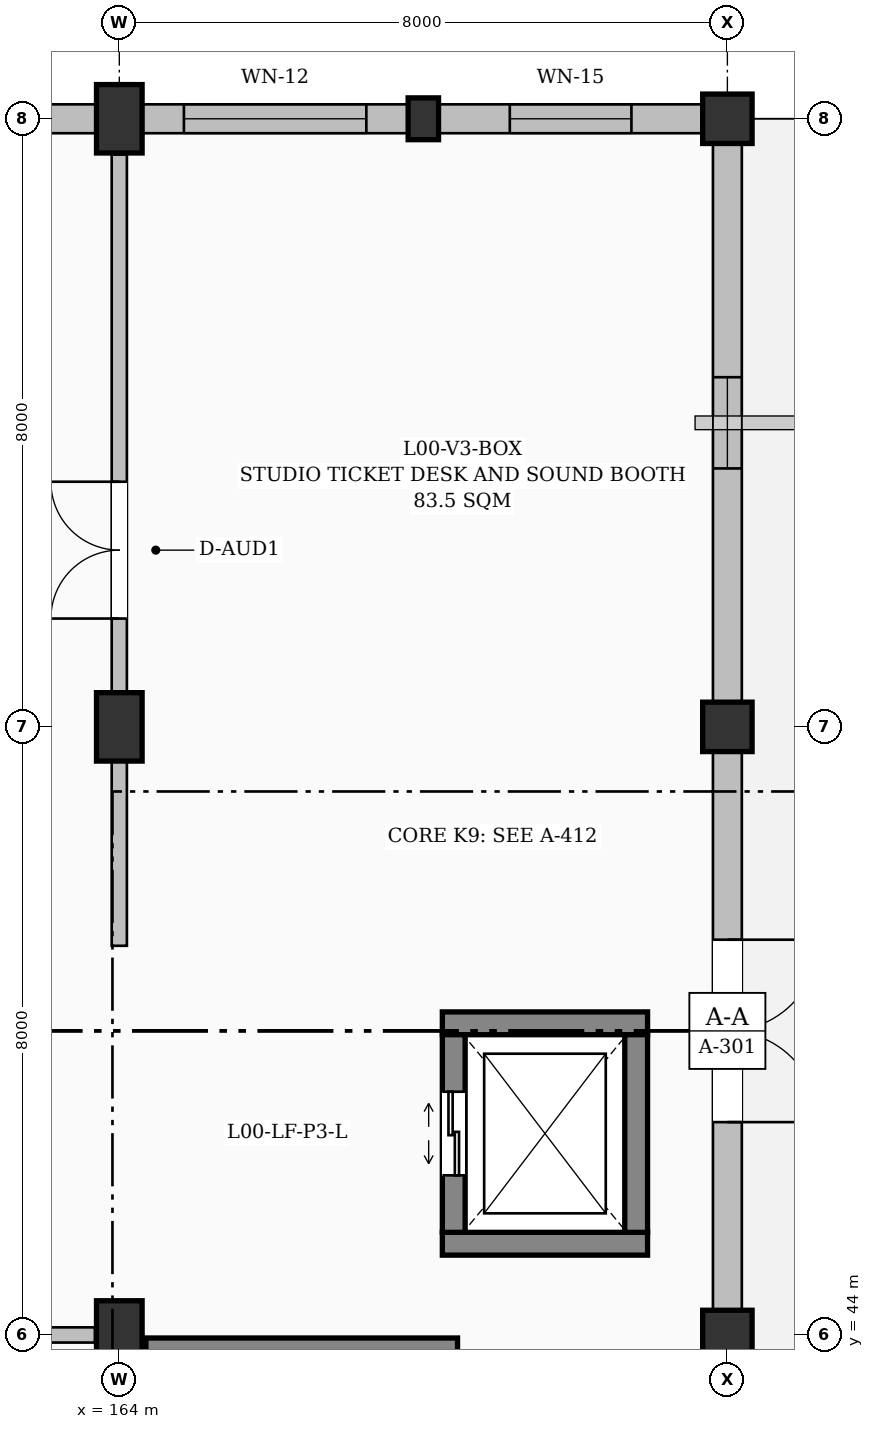
"""IFC4 building model, lengths in metres.
Left out: names, types, materials, properties, quantities, classifications, styles, units other than length and angle.
Written with IfcOpenShell. Run it as: python <this file> out.ifc"""

import sys

from ifc_helpers import new_model, si_unit, direction, frame, frame_2d, origin, origin_2d, place, context, subcontext, project, spatial, rectangle, extrude, element, fill, save


model = new_model("IFC4")
c1 = context("Model", 3, precision=1e-05, world=origin(), true_north=direction((0.0, 1.0)))
c2 = subcontext(c1, "Body", "Model", "MODEL_VIEW")
j1 = project(units=[si_unit("LENGTHUNIT", "METRE"), si_unit("PLANEANGLEUNIT", "RADIAN")], contexts=[c1])
p1 = place(None, origin())
s1 = spatial("IfcSite", under=j1, at=p1, CompositionType="ELEMENT")
p2 = place(p1, origin())
s2 = spatial("IfcBuilding", under=s1, at=p2, CompositionType="ELEMENT")
p3 = place(p2, origin())
s3 = spatial("IfcBuildingStorey", under=s2, at=p3, CompositionType="ELEMENT", Elevation=0.0)
for number, where, z_axis, x_axis in (
    (1, (164.0, 44.0, 0.0), (0.0, 0.0, 1.0), (1.0, 0.0, 0.0)),
    (2, (164.0, 52.0, 0.0), (0.0, 0.0, 1.0), (1.0, 0.0, 0.0)),
    (3, (164.0, 60.0, 0.0), (0.0, 0.0, 1.0), (1.0, 0.0, 0.0)),
):
    element("IfcColumn", number, at=place(p3, frame(where, z_axis=z_axis, x_axis=x_axis)), inside=s3, PredefinedType="COLUMN", context=c2, shape_type="SweptSolid", body=[
        extrude(rectangle(XDim=0.6, YDim=0.9, at=origin_2d()), origin(), (0.0, 0.0, 1.0), 4.8),
    ])
p4 = place(p3, frame((168.0, 60.0, 0.0), z_axis=(0.0, 0.0, 1.0), x_axis=(1.0, 0.0, 0.0)))
e4 = element("IfcColumn", 4, at=p4, inside=s3, PredefinedType="PILASTER", context=c2, shape_type="SweptSolid", body=[
    extrude(rectangle(XDim=0.4, YDim=0.55, at=origin_2d()), origin(), (0.0, 0.0, 1.0), 4.8),
])
for number, where, z_axis, x_axis in (
    (5, (172.0, 44.0, 0.0), (0.0, 0.0, 1.0), (1.0, 0.0, 0.0)),
    (6, (172.0, 52.0, 0.0), (0.0, 0.0, 1.0), (1.0, 0.0, 0.0)),
    (7, (172.0, 60.0, 0.0), (0.0, 0.0, 1.0), (1.0, 0.0, 0.0)),
):
    element("IfcColumn", number, at=place(p3, frame(where, z_axis=z_axis, x_axis=x_axis)), inside=s3, PredefinedType="COLUMN", context=c2, shape_type="SweptSolid", body=[
        extrude(rectangle(XDim=0.65, YDim=0.65, at=origin_2d()), origin(), (0.0, 0.0, 1.0), 4.8),
    ])
p5 = place(p3, frame((160.225, 60.0, 0.0), z_axis=(0.0, 0.0, 1.0), x_axis=(1.0, 0.0, 0.0)))
e8 = element("IfcWall", 8, at=p5, inside=s3, PredefinedType="SOLIDWALL", context=c2, shape_type="SweptSolid", body=[
    extrude(rectangle(XDim=3.475, YDim=0.38, at=frame_2d((1.737, 0.0))), origin(), (0.0, 0.0, 1.0), 4.235),
])
p6 = place(p5, frame((0.988, 0.0, 0.95)))
e9 = element("IfcOpeningElement", 9, at=p6, cuts=e8, PredefinedType="OPENING", context=c2, shape_type="SweptSolid", body=[
    extrude(rectangle(XDim=1.5, YDim=1.5, at=frame_2d((0.75, 0.75))), frame((0.0, 0.2, 0.0), z_axis=(0.0, -1.0, 0.0), x_axis=(1.0, 0.0, 0.0)), (0.0, 0.0, 1.0), 0.4),
])
p7 = place(p3, frame((164.3, 60.0, 0.0), z_axis=(0.0, 0.0, 1.0), x_axis=(1.0, 0.0, 0.0)))
e10 = element("IfcWall", 10, at=p7, inside=s3, PredefinedType="SOLIDWALL", context=c2, shape_type="SweptSolid", body=[
    extrude(rectangle(XDim=3.5, YDim=0.38, at=frame_2d((1.75, 0.0))), origin(), (0.0, 0.0, 1.0), 4.035),
])
p8 = place(p7, frame((0.55, 0.0, 0.95)))
e11 = element("IfcOpeningElement", 11, at=p8, cuts=e10, PredefinedType="OPENING", context=c2, shape_type="SweptSolid", body=[
    extrude(rectangle(XDim=2.4, YDim=1.5, at=frame_2d((1.2, 0.75))), frame((0.0, 0.2, 0.0), z_axis=(0.0, -1.0, 0.0), x_axis=(1.0, 0.0, 0.0)), (0.0, 0.0, 1.0), 0.4),
])
p9 = place(p3, frame((168.2, 60.0, 0.0), z_axis=(0.0, 0.0, 1.0), x_axis=(1.0, 0.0, 0.0)))
e12 = element("IfcWall", 12, at=p9, inside=s3, PredefinedType="SOLIDWALL", context=c2, shape_type="SweptSolid", body=[
    extrude(rectangle(XDim=3.475, YDim=0.38, at=frame_2d((1.738, 0.0))), origin(), (0.0, 0.0, 1.0), 4.035),
])
p10 = place(p9, frame((0.938, 0.0, 0.95)))
e13 = element("IfcOpeningElement", 13, at=p10, cuts=e12, PredefinedType="OPENING", context=c2, shape_type="SweptSolid", body=[
    extrude(rectangle(XDim=1.6, YDim=1.2, at=frame_2d((0.8, 0.6))), frame((0.0, 0.2, 0.0), z_axis=(0.0, -1.0, 0.0), x_axis=(1.0, 0.0, 0.0)), (0.0, 0.0, 1.0), 0.4),
])
p11 = place(p3, frame((172.0, 59.675, 0.0), z_axis=(0.0, 0.0, 1.0), x_axis=(0.0, -1.0, 0.0)))
e14 = element("IfcWall", 14, at=p11, inside=s3, PredefinedType="SOLIDWALL", context=c2, shape_type="SweptSolid", body=[
    extrude(rectangle(XDim=7.35, YDim=0.38, at=frame_2d((3.675, 0.0))), origin(), (0.0, 0.0, 1.0), 4.335),
])
p12 = place(p11, frame((3.075, 0.0, 0.95)))
e15 = element("IfcOpeningElement", 15, at=p12, cuts=e14, PredefinedType="OPENING", context=c2, shape_type="SweptSolid", body=[
    extrude(rectangle(XDim=1.2, YDim=1.5, at=frame_2d((0.6, 0.75))), frame((0.0, 0.2, 0.0), z_axis=(0.0, -1.0, 0.0), x_axis=(1.0, 0.0, 0.0)), (0.0, 0.0, 1.0), 0.4),
])
p13 = place(p3, frame((172.0, 51.675, 0.0), z_axis=(0.0, 0.0, 1.0), x_axis=(0.0, -1.0, 0.0)))
e16 = element("IfcWall", 16, at=p13, inside=s3, PredefinedType="SOLIDWALL", context=c2, shape_type="SweptSolid", body=[
    extrude(rectangle(XDim=7.35, YDim=0.38, at=frame_2d((3.675, 0.0))), origin(), (0.0, 0.0, 1.0), 4.235),
])
p14 = place(p13, frame((2.475, 0.0, 0.0)))
e17 = element("IfcOpeningElement", 17, at=p14, cuts=e16, PredefinedType="OPENING", context=c2, shape_type="SweptSolid", body=[
    extrude(rectangle(XDim=2.4, YDim=2.4, at=frame_2d((1.2, 1.2))), frame((0.0, 0.2, 0.0), z_axis=(0.0, -1.0, 0.0), x_axis=(1.0, 0.0, 0.0)), (0.0, 0.0, 1.0), 0.4),
])
p15 = place(p3, frame((168.45, 43.81, 0.0), z_axis=(0.0, 0.0, 1.0), x_axis=(-1.0, 0.0, 0.0)))
e18 = element("IfcWall", 18, at=p15, inside=s3, PredefinedType="SHEAR", context=c2, shape_type="SweptSolid", body=[
    extrude(rectangle(XDim=4.1, YDim=0.3, at=frame_2d((2.05, 0.0))), origin(), (0.0, 0.0, 1.0), 4.55),
])
for number, where, z_axis, x_axis in (
    (19, (168.25, 45.2, 0.0), (0.0, 0.0, 1.0), (1.0, 0.0, 0.0)),
    (20, (170.95, 48.1, 0.0), (0.0, 0.0, 1.0), (-1.0, 0.0, 0.0)),
):
    element("IfcWall", number, at=place(p3, frame(where, z_axis=z_axis, x_axis=x_axis)), inside=s3, PredefinedType="SHEAR", context=c2, shape_type="SweptSolid", body=[
        extrude(rectangle(XDim=2.7, YDim=0.3, at=frame_2d((1.35, 0.0))), origin(), (0.0, 0.0, 1.0), 4.55),
    ])
p16 = place(p3, frame((168.4, 45.35, 0.0), z_axis=(0.0, 0.0, 1.0), x_axis=(0.0, 1.0, 0.0)))
e21 = element("IfcWall", 21, at=p16, inside=s3, PredefinedType="SHEAR", context=c2, shape_type="SweptSolid", body=[
    extrude(rectangle(XDim=2.6, YDim=0.3, at=frame_2d((1.3, 0.0))), origin(), (0.0, 0.0, 1.0), 4.55),
])
p17 = place(p16, frame((0.75, 0.0, 0.0)))
e22 = element("IfcOpeningElement", 22, at=p17, cuts=e21, PredefinedType="OPENING", context=c2, shape_type="SweptSolid", body=[
    extrude(rectangle(XDim=1.1, YDim=2.15, at=frame_2d((0.55, 1.075))), frame((0.0, 0.16, 0.0), z_axis=(0.0, -1.0, 0.0), x_axis=(1.0, 0.0, 0.0)), (0.0, 0.0, 1.0), 0.32),
])
p18 = place(p3, frame((170.8, 47.95, 0.0), z_axis=(0.0, 0.0, 1.0), x_axis=(0.0, -1.0, 0.0)))
e23 = element("IfcWall", 23, at=p18, inside=s3, PredefinedType="SHEAR", context=c2, shape_type="SweptSolid", body=[
    extrude(rectangle(XDim=2.6, YDim=0.3, at=frame_2d((1.3, 0.0))), origin(), (0.0, 0.0, 1.0), 4.55),
])
p19 = place(p3, frame((140.42, 44.0, 0.0), z_axis=(0.0, 0.0, 1.0), x_axis=(1.0, 0.0, 0.0)))
e24 = element("IfcWall", 24, at=p19, inside=s3, PredefinedType="PARTITIONING", context=c2, shape_type="SweptSolid", body=[
    extrude(rectangle(XDim=23.26, YDim=0.2, at=frame_2d((11.63, 0.0))), origin(), (0.0, 0.0, 1.0), 3.735),
])
p20 = place(p19, frame((10.73, 0.0, 0.0)))
e25 = element("IfcOpeningElement", 25, at=p20, cuts=e24, PredefinedType="OPENING", context=c2, shape_type="SweptSolid", body=[
    extrude(rectangle(XDim=1.8, YDim=2.35, at=frame_2d((0.9, 1.175))), frame((0.0, 0.11, 0.0), z_axis=(0.0, -1.0, 0.0), x_axis=(1.0, 0.0, 0.0)), (0.0, 0.0, 1.0), 0.22),
])
p21 = place(p3, frame((164.0, 49.12, 0.0), z_axis=(0.0, 0.0, 1.0), x_axis=(0.0, 1.0, 0.0)))
e26 = element("IfcWall", 26, at=p21, inside=s3, PredefinedType="PARTITIONING", context=c2, shape_type="SweptSolid", body=[
    extrude(rectangle(XDim=10.41, YDim=0.2, at=frame_2d((5.205, 0.0))), origin(), (0.0, 0.0, 1.0), 3.935),
])
p22 = place(p21, frame((4.305, 0.0, 0.0)))
e27 = element("IfcOpeningElement", 27, at=p22, cuts=e26, PredefinedType="OPENING", context=c2, shape_type="SweptSolid", body=[
    extrude(rectangle(XDim=1.8, YDim=2.35, at=frame_2d((0.9, 1.175))), frame((0.0, 0.11, 0.0), z_axis=(0.0, -1.0, 0.0), x_axis=(1.0, 0.0, 0.0)), (0.0, 0.0, 1.0), 0.22),
])
p23 = place(p8, origin())
e28 = element("IfcWindow", 28, at=p23, inside=s3, PartitioningType="TRIPLE_PANEL_VERTICAL", PredefinedType="WINDOW", context=c2, shape_type="SweptSolid", body=[
    extrude(rectangle(XDim=2.4, YDim=1.5, at=frame_2d((1.2, 0.75))), frame((0.0, 0.03, 0.0), z_axis=(0.0, -1.0, 0.0), x_axis=(1.0, 0.0, 0.0)), (0.0, 0.0, 1.0), 0.06),
])
fill(e11, e28)
p24 = place(p10, origin())
e29 = element("IfcWindow", 29, at=p24, inside=s3, PartitioningType="DOUBLE_PANEL_HORIZONTAL", PredefinedType="WINDOW", context=c2, shape_type="SweptSolid", body=[
    extrude(rectangle(XDim=1.6, YDim=1.2, at=frame_2d((0.8, 0.6))), frame((0.0, 0.03, 0.0), z_axis=(0.0, -1.0, 0.0), x_axis=(1.0, 0.0, 0.0)), (0.0, 0.0, 1.0), 0.06),
])
fill(e13, e29)
p25 = place(p12, origin())
e30 = element("IfcWindow", 30, at=p25, inside=s3, PartitioningType="SINGLE_PANEL", PredefinedType="WINDOW", context=c2, shape_type="SweptSolid", body=[
    extrude(rectangle(XDim=1.2, YDim=1.5, at=frame_2d((0.6, 0.75))), frame((0.0, 0.03, 0.0), z_axis=(0.0, -1.0, 0.0), x_axis=(1.0, 0.0, 0.0)), (0.0, 0.0, 1.0), 0.06),
])
fill(e15, e30)
p26 = place(p14, origin())
e31 = element("IfcDoor", 31, at=p26, inside=s3, OperationType="DOUBLE_DOOR_SINGLE_SWING", PredefinedType="DOOR", context=c2, shape_type="SweptSolid", body=[
    extrude(rectangle(XDim=2.4, YDim=2.4, at=frame_2d((1.2, 1.2))), frame((0.0, 0.025, 0.0), z_axis=(0.0, -1.0, 0.0), x_axis=(1.0, 0.0, 0.0)), (0.0, 0.0, 1.0), 0.05),
])
fill(e17, e31)
p27 = place(p17, origin())
e32 = element("IfcDoor", 32, at=p27, inside=s3, OperationType="DOUBLE_DOOR_SLIDING", PredefinedType="DOOR", context=c2, shape_type="SweptSolid", body=[
    extrude(rectangle(XDim=1.1, YDim=2.15, at=frame_2d((0.55, 1.075))), frame((0.0, 0.025, 0.0), z_axis=(0.0, -1.0, 0.0), x_axis=(1.0, 0.0, 0.0)), (0.0, 0.0, 1.0), 0.05),
])
fill(e22, e32)
p28 = place(p22, origin())
e33 = element("IfcDoor", 33, at=p28, inside=s3, OperationType="DOUBLE_DOOR_SINGLE_SWING", PredefinedType="DOOR", context=c2, shape_type="SweptSolid", body=[
    extrude(rectangle(XDim=1.8, YDim=2.35, at=frame_2d((0.9, 1.175))), frame((0.0, 0.025, 0.0), z_axis=(0.0, -1.0, 0.0), x_axis=(1.0, 0.0, 0.0)), (0.0, 0.0, 1.0), 0.05),
])
fill(e27, e33)
save(model, sys.argv[1])
